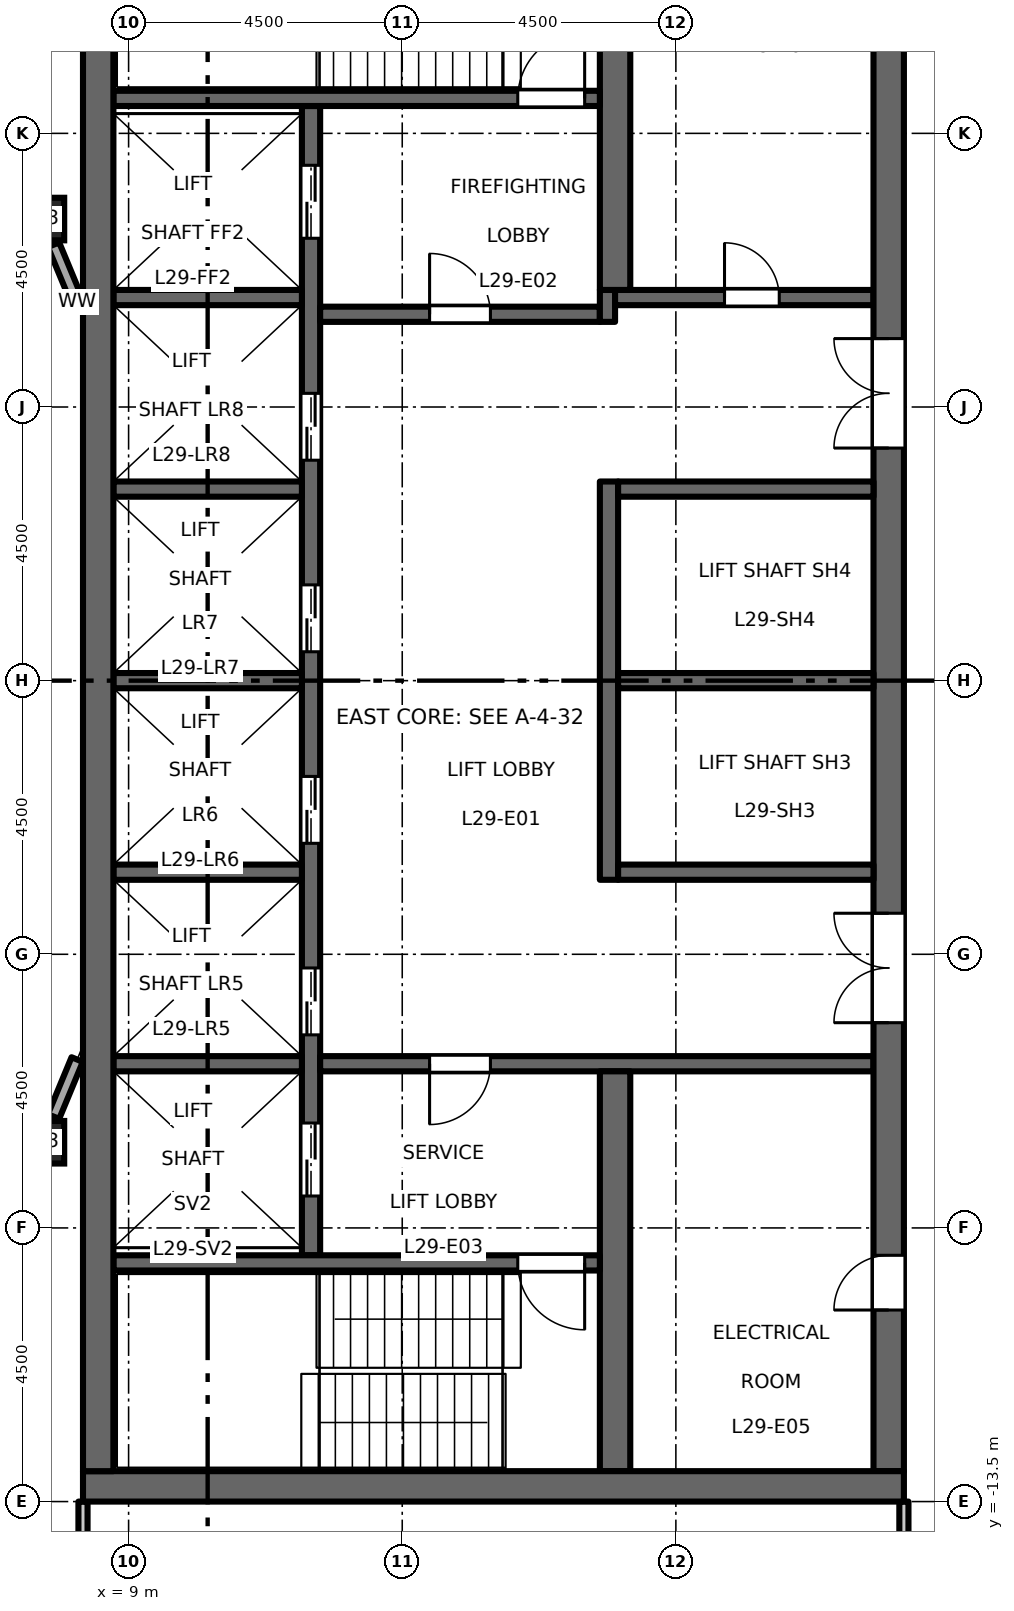
"""IFC4 building model, lengths in metres.
Left out: names, types, materials, properties, quantities, classifications, styles, units other than length and angle.
Written with IfcOpenShell. Run it as: python <this file> out.ifc"""

import sys

from ifc_helpers import new_model, si_unit, direction, frame, frame_2d, origin, origin_2d, place, context, subcontext, project, spatial, rectangle, hollow_rectangle, extrude, element, fill, save


model = new_model("IFC4")
c1 = context("Model", 3, precision=1e-05, world=origin(), true_north=direction((0.0, 1.0)))
c2 = subcontext(c1, "Body", "Model", "MODEL_VIEW")
j1 = project(units=[si_unit("LENGTHUNIT", "METRE"), si_unit("PLANEANGLEUNIT", "RADIAN")], contexts=[c1])
p1 = place(None, origin())
s1 = spatial("IfcSite", under=j1, at=p1, CompositionType="ELEMENT")
p2 = place(p1, origin())
s2 = spatial("IfcBuilding", under=s1, at=p2, CompositionType="ELEMENT")
p3 = place(p2, frame((0.0, 0.0, 136.2)))
s3 = spatial("IfcBuildingStorey", under=s2, at=p3, CompositionType="ELEMENT", Elevation=136.2)
for number, where, z_axis, x_axis in (
    (1, (7.591, -7.591, 0.0), (0.0, 0.0, 1.0), (1.0, 0.0, 0.0)),
    (2, (7.591, 7.591, 0.0), (0.0, 0.0, 1.0), (1.0, 0.0, 0.0)),
):
    element("IfcColumn", number, at=place(p3, frame(where, z_axis=z_axis, x_axis=x_axis)), inside=s3, PredefinedType="COLUMN", context=c2, shape_type="SweptSolid", body=[
        extrude(hollow_rectangle(XDim=0.7, YDim=0.7, WallThickness=0.04, at=origin_2d()), origin(), (0.0, 0.0, 1.0), 4.5),
    ])
p4 = place(p3, frame((12.0, -9.45, 0.0), z_axis=(0.0, 0.0, 1.0), x_axis=(0.0, 1.0, 0.0)))
e3 = element("IfcWall", 3, at=p4, inside=s3, PredefinedType="SHEAR", context=c2, shape_type="SweptSolid", body=[
    extrude(rectangle(XDim=18.9, YDim=0.3, at=frame_2d((9.45, 0.0))), origin(), (0.0, 0.0, 1.0), 4.35),
])
p5 = place(p4, frame((3.625, 0.0, 0.0)))
e4 = element("IfcOpeningElement", 4, at=p5, cuts=e3, PredefinedType="OPENING", context=c2, shape_type="SweptSolid", body=[
    extrude(rectangle(XDim=1.1, YDim=2.1, at=frame_2d((0.55, 1.05))), frame((0.0, 0.16, 0.0), z_axis=(0.0, -1.0, 0.0), x_axis=(1.0, 0.0, 0.0)), (0.0, 0.0, 1.0), 0.32),
])
p6 = place(p4, frame((6.775, 0.0, 0.0)))
e5 = element("IfcOpeningElement", 5, at=p6, cuts=e3, PredefinedType="OPENING", context=c2, shape_type="SweptSolid", body=[
    extrude(rectangle(XDim=1.1, YDim=2.1, at=frame_2d((0.55, 1.05))), frame((0.0, 0.16, 0.0), z_axis=(0.0, -1.0, 0.0), x_axis=(1.0, 0.0, 0.0)), (0.0, 0.0, 1.0), 0.32),
])
p7 = place(p4, frame((9.925, 0.0, 0.0)))
e6 = element("IfcOpeningElement", 6, at=p7, cuts=e3, PredefinedType="OPENING", context=c2, shape_type="SweptSolid", body=[
    extrude(rectangle(XDim=1.1, YDim=2.1, at=frame_2d((0.55, 1.05))), frame((0.0, 0.16, 0.0), z_axis=(0.0, -1.0, 0.0), x_axis=(1.0, 0.0, 0.0)), (0.0, 0.0, 1.0), 0.32),
])
p8 = place(p4, frame((13.075, 0.0, 0.0)))
e7 = element("IfcOpeningElement", 7, at=p8, cuts=e3, PredefinedType="OPENING", context=c2, shape_type="SweptSolid", body=[
    extrude(rectangle(XDim=1.1, YDim=2.1, at=frame_2d((0.55, 1.05))), frame((0.0, 0.16, 0.0), z_axis=(0.0, -1.0, 0.0), x_axis=(1.0, 0.0, 0.0)), (0.0, 0.0, 1.0), 0.32),
])
p9 = place(p4, frame((16.725, 0.0, 0.0)))
e8 = element("IfcOpeningElement", 8, at=p9, cuts=e3, PredefinedType="OPENING", context=c2, shape_type="SweptSolid", body=[
    extrude(rectangle(XDim=1.2, YDim=2.1, at=frame_2d((0.6, 1.05))), frame((0.0, 0.16, 0.0), z_axis=(0.0, -1.0, 0.0), x_axis=(1.0, 0.0, 0.0)), (0.0, 0.0, 1.0), 0.32),
])
p10 = place(p4, frame((0.975, 0.0, 0.0)))
e9 = element("IfcOpeningElement", 9, at=p10, cuts=e3, PredefinedType="OPENING", context=c2, shape_type="SweptSolid", body=[
    extrude(rectangle(XDim=1.2, YDim=2.1, at=frame_2d((0.6, 1.05))), frame((0.0, 0.16, 0.0), z_axis=(0.0, -1.0, 0.0), x_axis=(1.0, 0.0, 0.0)), (0.0, 0.0, 1.0), 0.32),
])
p11 = place(p3, frame((12.15, 6.025, 0.0), z_axis=(0.0, 0.0, 1.0), x_axis=(1.0, 0.0, 0.0)))
e10 = element("IfcWall", 10, at=p11, inside=s3, PredefinedType="SHEAR", context=c2, shape_type="SweptSolid", body=[
    extrude(rectangle(XDim=4.6, YDim=0.25, at=frame_2d((2.3, 0.0))), origin(), (0.0, 0.0, 1.0), 4.35),
])
p12 = place(p11, frame((1.8, 0.0, 0.0)))
e11 = element("IfcOpeningElement", 11, at=p12, cuts=e10, PredefinedType="OPENING", context=c2, shape_type="SweptSolid", body=[
    extrude(rectangle(XDim=1.0, YDim=2.1, at=frame_2d((0.5, 1.05))), frame((0.0, 0.135, 0.0), z_axis=(0.0, -1.0, 0.0), x_axis=(1.0, 0.0, 0.0)), (0.0, 0.0, 1.0), 0.27),
])
p13 = place(p3, frame((16.875, 5.9, 0.0), z_axis=(0.0, 0.0, 1.0), x_axis=(0.0, 1.0, 0.0)))
e12 = element("IfcWall", 12, at=p13, inside=s3, PredefinedType="SHEAR", context=c2, shape_type="SweptSolid", body=[
    extrude(rectangle(XDim=0.525, YDim=0.25, at=frame_2d((0.263, 0.0))), origin(), (0.0, 0.0, 1.0), 4.35),
])
p14 = place(p3, frame((17.0, 6.3, 0.0), z_axis=(0.0, 0.0, 1.0), x_axis=(1.0, 0.0, 0.0)))
e13 = element("IfcWall", 13, at=p14, inside=s3, PredefinedType="SHEAR", context=c2, shape_type="SweptSolid", body=[
    extrude(rectangle(XDim=4.25, YDim=0.25, at=frame_2d((2.125, 0.0))), origin(), (0.0, 0.0, 1.0), 4.35),
])
p15 = place(p14, frame((1.8, 0.0, 0.0)))
e14 = element("IfcOpeningElement", 14, at=p15, cuts=e13, PredefinedType="OPENING", context=c2, shape_type="SweptSolid", body=[
    extrude(rectangle(XDim=0.9, YDim=2.1, at=frame_2d((0.45, 1.05))), frame((0.0, 0.135, 0.0), z_axis=(0.0, -1.0, 0.0), x_axis=(1.0, 0.0, 0.0)), (0.0, 0.0, 1.0), 0.27),
])
p16 = place(p3, frame((12.15, -6.3, 0.0), z_axis=(0.0, 0.0, 1.0), x_axis=(1.0, 0.0, 0.0)))
e15 = element("IfcWall", 15, at=p16, inside=s3, PredefinedType="SHEAR", context=c2, shape_type="SweptSolid", body=[
    extrude(rectangle(XDim=9.1, YDim=0.25, at=frame_2d((4.55, 0.0))), origin(), (0.0, 0.0, 1.0), 4.35),
])
p17 = place(p16, frame((1.8, 0.0, 0.0)))
e16 = element("IfcOpeningElement", 16, at=p17, cuts=e15, PredefinedType="OPENING", context=c2, shape_type="SweptSolid", body=[
    extrude(rectangle(XDim=1.0, YDim=2.1, at=frame_2d((0.5, 1.05))), frame((0.0, 0.135, 0.0), z_axis=(0.0, -1.0, 0.0), x_axis=(1.0, 0.0, 0.0)), (0.0, 0.0, 1.0), 0.27),
])
p18 = place(p3, frame((21.5, -13.0, 0.0), z_axis=(0.0, 0.0, 1.0), x_axis=(0.0, 1.0, 0.0)))
e17 = element("IfcWall", 17, at=p18, inside=s3, PredefinedType="SHEAR", context=c2, shape_type="SweptSolid", body=[
    extrude(rectangle(XDim=26.0, YDim=0.5, at=frame_2d((13.0, 0.0))), origin(), (0.0, 0.0, 1.0), 4.35),
])
p19 = place(p18, frame((16.825, 0.0, 0.0)))
e18 = element("IfcOpeningElement", 18, at=p19, cuts=e17, PredefinedType="OPENING", context=c2, shape_type="SweptSolid", body=[
    extrude(rectangle(XDim=1.8, YDim=2.1, at=frame_2d((0.9, 1.05))), frame((0.0, 0.26, 0.0), z_axis=(0.0, -1.0, 0.0), x_axis=(1.0, 0.0, 0.0)), (0.0, 0.0, 1.0), 0.52),
])
p20 = place(p18, frame((7.375, 0.0, 0.0)))
e19 = element("IfcOpeningElement", 19, at=p20, cuts=e17, PredefinedType="OPENING", context=c2, shape_type="SweptSolid", body=[
    extrude(rectangle(XDim=1.8, YDim=2.1, at=frame_2d((0.9, 1.05))), frame((0.0, 0.26, 0.0), z_axis=(0.0, -1.0, 0.0), x_axis=(1.0, 0.0, 0.0)), (0.0, 0.0, 1.0), 0.52),
])
p21 = place(p18, frame((2.65, 0.0, 0.0)))
e20 = element("IfcOpeningElement", 20, at=p21, cuts=e17, PredefinedType="OPENING", context=c2, shape_type="SweptSolid", body=[
    extrude(rectangle(XDim=0.9, YDim=2.1, at=frame_2d((0.45, 1.05))), frame((0.0, 0.26, 0.0), z_axis=(0.0, -1.0, 0.0), x_axis=(1.0, 0.0, 0.0)), (0.0, 0.0, 1.0), 0.52),
])
p22 = place(p3, frame((16.9, -3.275, 0.0), z_axis=(0.0, 0.0, 1.0), x_axis=(0.0, 1.0, 0.0)))
e21 = element("IfcWall", 21, at=p22, inside=s3, PredefinedType="SHEAR", context=c2, shape_type="SweptSolid", body=[
    extrude(rectangle(XDim=6.55, YDim=0.3, at=frame_2d((3.275, 0.0))), origin(), (0.0, 0.0, 1.0), 4.35),
])
for number, where, z_axis, x_axis in (
    (22, (17.05, 0.0, 0.0), (0.0, 0.0, 1.0), (1.0, 0.0, 0.0)),
    (23, (17.05, 3.15, 0.0), (0.0, 0.0, 1.0), (1.0, 0.0, 0.0)),
    (24, (17.05, -3.15, 0.0), (0.0, 0.0, 1.0), (1.0, 0.0, 0.0)),
):
    element("IfcWall", number, at=place(p3, frame(where, z_axis=z_axis, x_axis=x_axis)), inside=s3, PredefinedType="SHEAR", context=c2, shape_type="SweptSolid", body=[
        extrude(rectangle(XDim=4.2, YDim=0.25, at=frame_2d((2.1, 0.0))), origin(), (0.0, 0.0, 1.0), 4.35),
    ])
for number, where, z_axis, x_axis in (
    (25, (17.0, 6.425, 0.0), (0.0, 0.0, 1.0), (0.0, 1.0, 0.0)),
    (26, (17.0, -13.0, 0.0), (0.0, 0.0, 1.0), (0.0, 1.0, 0.0)),
):
    element("IfcWall", number, at=place(p3, frame(where, z_axis=z_axis, x_axis=x_axis)), inside=s3, PredefinedType="SHEAR", context=c2, shape_type="SweptSolid", body=[
        extrude(rectangle(XDim=6.575, YDim=0.5, at=frame_2d((3.288, 0.0))), origin(), (0.0, 0.0, 1.0), 4.35),
    ])
for number, where, z_axis, x_axis in (
    (27, (8.75, 0.0, 0.0), (0.0, 0.0, 1.0), (1.0, 0.0, 0.0)),
    (28, (8.75, 3.15, 0.0), (0.0, 0.0, 1.0), (1.0, 0.0, 0.0)),
    (29, (8.75, 6.3, 0.0), (0.0, 0.0, 1.0), (1.0, 0.0, 0.0)),
    (30, (8.75, -3.15, 0.0), (0.0, 0.0, 1.0), (1.0, 0.0, 0.0)),
    (31, (8.75, -6.3, 0.0), (0.0, 0.0, 1.0), (1.0, 0.0, 0.0)),
):
    element("IfcWall", number, at=place(p3, frame(where, z_axis=z_axis, x_axis=x_axis)), inside=s3, PredefinedType="SHEAR", context=c2, shape_type="SweptSolid", body=[
        extrude(rectangle(XDim=3.1, YDim=0.25, at=frame_2d((1.55, 0.0))), origin(), (0.0, 0.0, 1.0), 4.35),
    ])
p23 = place(p3, frame((8.75, 9.575, 0.0), z_axis=(0.0, 0.0, 1.0), x_axis=(1.0, 0.0, 0.0)))
e32 = element("IfcWall", 32, at=p23, inside=s3, PredefinedType="SHEAR", context=c2, shape_type="SweptSolid", body=[
    extrude(rectangle(XDim=8.0, YDim=0.25, at=frame_2d((4.0, 0.0))), origin(), (0.0, 0.0, 1.0), 4.35),
])
p24 = place(p23, frame((6.65, 0.0, 0.0)))
e33 = element("IfcOpeningElement", 33, at=p24, cuts=e32, PredefinedType="OPENING", context=c2, shape_type="SweptSolid", body=[
    extrude(rectangle(XDim=1.1, YDim=2.1, at=frame_2d((0.55, 1.05))), frame((0.0, 0.135, 0.0), z_axis=(0.0, -1.0, 0.0), x_axis=(1.0, 0.0, 0.0)), (0.0, 0.0, 1.0), 0.27),
])
p25 = place(p3, frame((8.75, -9.575, 0.0), z_axis=(0.0, 0.0, 1.0), x_axis=(1.0, 0.0, 0.0)))
e34 = element("IfcWall", 34, at=p25, inside=s3, PredefinedType="SHEAR", context=c2, shape_type="SweptSolid", body=[
    extrude(rectangle(XDim=8.0, YDim=0.25, at=frame_2d((4.0, 0.0))), origin(), (0.0, 0.0, 1.0), 4.35),
])
p26 = place(p25, frame((6.65, 0.0, 0.0)))
e35 = element("IfcOpeningElement", 35, at=p26, cuts=e34, PredefinedType="OPENING", context=c2, shape_type="SweptSolid", body=[
    extrude(rectangle(XDim=1.1, YDim=2.1, at=frame_2d((0.55, 1.05))), frame((0.0, 0.135, 0.0), z_axis=(0.0, -1.0, 0.0), x_axis=(1.0, 0.0, 0.0)), (0.0, 0.0, 1.0), 0.27),
])
p27 = place(p3, frame((8.25, -13.25, 0.0), z_axis=(0.0, 0.0, 1.0), x_axis=(1.0, 0.0, 0.0)))
e36 = element("IfcWall", 36, at=p27, inside=s3, PredefinedType="SHEAR", context=c2, shape_type="SweptSolid", body=[
    extrude(rectangle(XDim=13.5, YDim=0.5, at=frame_2d((6.75, 0.0))), origin(), (0.0, 0.0, 1.0), 4.35),
])
p28 = place(p3, frame((8.5, -13.0, 0.0), z_axis=(0.0, 0.0, 1.0), x_axis=(0.0, 1.0, 0.0)))
e37 = element("IfcWall", 37, at=p28, inside=s3, PredefinedType="SHEAR", context=c2, shape_type="SweptSolid", body=[
    extrude(rectangle(XDim=26.0, YDim=0.5, at=frame_2d((13.0, 0.0))), origin(), (0.0, 0.0, 1.0), 4.35),
])
for number, where, z_axis, x_axis in (
    (38, (7.766, -7.168, 0.0), (0.0, 0.0, 1.0), (0.383, 0.924, 0.0)),
    (39, (8.154, 6.231, 0.0), (0.0, 0.0, 1.0), (-0.383, 0.924, 0.0)),
):
    element("IfcWall", number, at=place(p3, frame(where, z_axis=z_axis, x_axis=x_axis)), inside=s3, PredefinedType="STANDARD", context=c2, shape_type="SweptSolid", body=[
        extrude(rectangle(XDim=1.015, YDim=0.2, at=frame_2d((0.507, 0.0))), origin(), (0.0, 0.0, 1.0), 3.826),
    ])
p29 = place(p3, frame((8.25, -16.8, 0.0), z_axis=(0.0, 0.0, 1.0), x_axis=(0.0, 1.0, 0.0)))
e40 = element("IfcWall", 40, at=p29, inside=s3, PredefinedType="PARTITIONING", context=c2, shape_type="SweptSolid", body=[
    extrude(rectangle(XDim=3.3, YDim=0.15, at=frame_2d((1.65, 0.0))), origin(), (0.0, 0.0, 1.0), 4.35),
])
p30 = place(p3, frame((21.75, -18.925, 0.0), z_axis=(0.0, 0.0, 1.0), x_axis=(0.0, 1.0, 0.0)))
e41 = element("IfcWall", 41, at=p30, inside=s3, PredefinedType="PARTITIONING", context=c2, shape_type="SweptSolid", body=[
    extrude(rectangle(XDim=5.425, YDim=0.15, at=frame_2d((2.712, 0.0))), origin(), (0.0, 0.0, 1.0), 4.35),
])
p31 = place(p12, origin())
e42 = element("IfcDoor", 42, at=p31, inside=s3, OperationType="SINGLE_SWING_RIGHT", PredefinedType="DOOR", context=c2, shape_type="SweptSolid", body=[
    extrude(rectangle(XDim=1.0, YDim=2.1, at=frame_2d((0.5, 1.05))), frame((0.0, 0.025, 0.0), z_axis=(0.0, -1.0, 0.0), x_axis=(1.0, 0.0, 0.0)), (0.0, 0.0, 1.0), 0.05),
])
fill(e11, e42)
p32 = place(p17, origin())
e43 = element("IfcDoor", 43, at=p32, inside=s3, OperationType="SINGLE_SWING_LEFT", PredefinedType="DOOR", context=c2, shape_type="SweptSolid", body=[
    extrude(rectangle(XDim=1.0, YDim=2.1, at=frame_2d((0.5, 1.05))), frame((0.0, 0.025, 0.0), z_axis=(0.0, -1.0, 0.0), x_axis=(1.0, 0.0, 0.0)), (0.0, 0.0, 1.0), 0.05),
])
fill(e16, e43)
p33 = place(p24, origin())
e44 = element("IfcDoor", 44, at=p33, inside=s3, OperationType="SINGLE_SWING_LEFT", PredefinedType="DOOR", context=c2, shape_type="SweptSolid", body=[
    extrude(rectangle(XDim=1.1, YDim=2.1, at=frame_2d((0.55, 1.05))), frame((0.0, 0.025, 0.0), z_axis=(0.0, -1.0, 0.0), x_axis=(1.0, 0.0, 0.0)), (0.0, 0.0, 1.0), 0.05),
])
fill(e33, e44)
p34 = place(p26, origin())
e45 = element("IfcDoor", 45, at=p34, inside=s3, OperationType="SINGLE_SWING_RIGHT", PredefinedType="DOOR", context=c2, shape_type="SweptSolid", body=[
    extrude(rectangle(XDim=1.1, YDim=2.1, at=frame_2d((0.55, 1.05))), frame((0.0, 0.025, 0.0), z_axis=(0.0, -1.0, 0.0), x_axis=(1.0, 0.0, 0.0)), (0.0, 0.0, 1.0), 0.05),
])
fill(e35, e45)
p35 = place(p19, origin())
e46 = element("IfcDoor", 46, at=p35, inside=s3, OperationType="DOUBLE_DOOR_DOUBLE_SWING", PredefinedType="DOOR", context=c2, shape_type="SweptSolid", body=[
    extrude(rectangle(XDim=1.8, YDim=2.1, at=frame_2d((0.9, 1.05))), frame((0.0, 0.025, 0.0), z_axis=(0.0, -1.0, 0.0), x_axis=(1.0, 0.0, 0.0)), (0.0, 0.0, 1.0), 0.05),
])
fill(e18, e46)
p36 = place(p20, origin())
e47 = element("IfcDoor", 47, at=p36, inside=s3, OperationType="DOUBLE_DOOR_DOUBLE_SWING", PredefinedType="DOOR", context=c2, shape_type="SweptSolid", body=[
    extrude(rectangle(XDim=1.8, YDim=2.1, at=frame_2d((0.9, 1.05))), frame((0.0, 0.025, 0.0), z_axis=(0.0, -1.0, 0.0), x_axis=(1.0, 0.0, 0.0)), (0.0, 0.0, 1.0), 0.05),
])
fill(e19, e47)
p37 = place(p5, origin())
e48 = element("IfcDoor", 48, at=p37, inside=s3, OperationType="DOUBLE_DOOR_SLIDING", PredefinedType="DOOR", context=c2, shape_type="SweptSolid", body=[
    extrude(rectangle(XDim=1.1, YDim=2.1, at=frame_2d((0.55, 1.05))), frame((0.0, 0.025, 0.0), z_axis=(0.0, -1.0, 0.0), x_axis=(1.0, 0.0, 0.0)), (0.0, 0.0, 1.0), 0.05),
])
fill(e4, e48)
p38 = place(p6, origin())
e49 = element("IfcDoor", 49, at=p38, inside=s3, OperationType="DOUBLE_DOOR_SLIDING", PredefinedType="DOOR", context=c2, shape_type="SweptSolid", body=[
    extrude(rectangle(XDim=1.1, YDim=2.1, at=frame_2d((0.55, 1.05))), frame((0.0, 0.025, 0.0), z_axis=(0.0, -1.0, 0.0), x_axis=(1.0, 0.0, 0.0)), (0.0, 0.0, 1.0), 0.05),
])
fill(e5, e49)
p39 = place(p7, origin())
e50 = element("IfcDoor", 50, at=p39, inside=s3, OperationType="DOUBLE_DOOR_SLIDING", PredefinedType="DOOR", context=c2, shape_type="SweptSolid", body=[
    extrude(rectangle(XDim=1.1, YDim=2.1, at=frame_2d((0.55, 1.05))), frame((0.0, 0.025, 0.0), z_axis=(0.0, -1.0, 0.0), x_axis=(1.0, 0.0, 0.0)), (0.0, 0.0, 1.0), 0.05),
])
fill(e6, e50)
p40 = place(p8, origin())
e51 = element("IfcDoor", 51, at=p40, inside=s3, OperationType="DOUBLE_DOOR_SLIDING", PredefinedType="DOOR", context=c2, shape_type="SweptSolid", body=[
    extrude(rectangle(XDim=1.1, YDim=2.1, at=frame_2d((0.55, 1.05))), frame((0.0, 0.025, 0.0), z_axis=(0.0, -1.0, 0.0), x_axis=(1.0, 0.0, 0.0)), (0.0, 0.0, 1.0), 0.05),
])
fill(e7, e51)
p41 = place(p9, origin())
e52 = element("IfcDoor", 52, at=p41, inside=s3, OperationType="DOUBLE_DOOR_SLIDING", PredefinedType="DOOR", context=c2, shape_type="SweptSolid", body=[
    extrude(rectangle(XDim=1.2, YDim=2.1, at=frame_2d((0.6, 1.05))), frame((0.0, 0.025, 0.0), z_axis=(0.0, -1.0, 0.0), x_axis=(1.0, 0.0, 0.0)), (0.0, 0.0, 1.0), 0.05),
])
fill(e8, e52)
p42 = place(p10, origin())
e53 = element("IfcDoor", 53, at=p42, inside=s3, OperationType="DOUBLE_DOOR_SLIDING", PredefinedType="DOOR", context=c2, shape_type="SweptSolid", body=[
    extrude(rectangle(XDim=1.2, YDim=2.1, at=frame_2d((0.6, 1.05))), frame((0.0, 0.025, 0.0), z_axis=(0.0, -1.0, 0.0), x_axis=(1.0, 0.0, 0.0)), (0.0, 0.0, 1.0), 0.05),
])
fill(e9, e53)
p43 = place(p15, origin())
e54 = element("IfcDoor", 54, at=p43, inside=s3, OperationType="SINGLE_SWING_RIGHT", PredefinedType="DOOR", context=c2, shape_type="SweptSolid", body=[
    extrude(rectangle(XDim=0.9, YDim=2.1, at=frame_2d((0.45, 1.05))), frame((0.0, 0.025, 0.0), z_axis=(0.0, -1.0, 0.0), x_axis=(1.0, 0.0, 0.0)), (0.0, 0.0, 1.0), 0.05),
])
fill(e14, e54)
p44 = place(p21, origin())
e55 = element("IfcDoor", 55, at=p44, inside=s3, OperationType="SINGLE_SWING_RIGHT", PredefinedType="DOOR", context=c2, shape_type="SweptSolid", body=[
    extrude(rectangle(XDim=0.9, YDim=2.1, at=frame_2d((0.45, 1.05))), frame((0.0, 0.025, 0.0), z_axis=(0.0, -1.0, 0.0), x_axis=(1.0, 0.0, 0.0)), (0.0, 0.0, 1.0), 0.05),
])
fill(e20, e55)
save(model, sys.argv[1])
